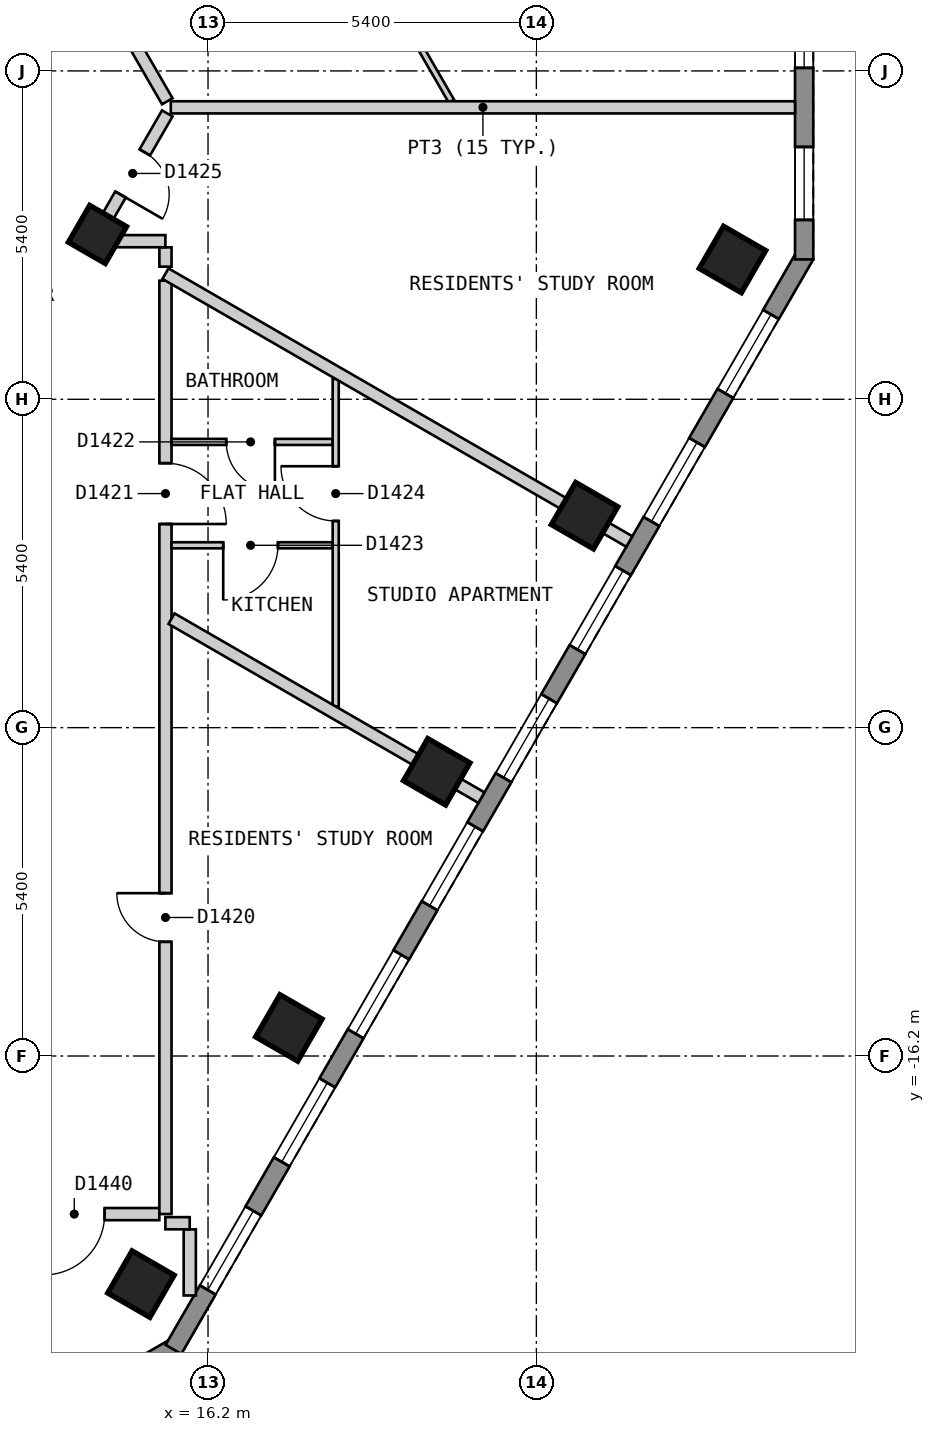
"""IFC4 building model, lengths in metres.
Left out: names, types, materials, properties, quantities, classifications, styles, units other than length and angle.
Written with IfcOpenShell. Run it as: python <this file> out.ifc"""

import sys

from ifc_helpers import new_model, si_unit, direction, frame, frame_2d, origin, origin_2d, place, context, subcontext, project, spatial, polyline, rectangle, outline, extrude, element, fill, save


model = new_model("IFC4")
c1 = context("Model", 3, precision=1e-05, world=origin(), true_north=direction((0.0, 1.0)))
c2 = subcontext(c1, "Body", "Model", "MODEL_VIEW")
j1 = project(units=[si_unit("LENGTHUNIT", "METRE"), si_unit("PLANEANGLEUNIT", "RADIAN")], contexts=[c1])
p1 = place(None, origin())
s1 = spatial("IfcSite", under=j1, at=p1, CompositionType="ELEMENT")
p2 = place(p1, origin())
s2 = spatial("IfcBuilding", under=s1, at=p2, CompositionType="ELEMENT")
p3 = place(p2, frame((0.0, 0.0, 178.2)))
s3 = spatial("IfcBuildingStorey", under=s2, at=p3, CompositionType="ELEMENT", Elevation=178.2)
for number, where, z_axis, x_axis in (
    (1, (15.097, -19.951, 0.0), (0.0, 0.0, 1.0), (0.5, 0.866, 0.0)),
    (2, (17.529, -15.738, 0.0), (0.0, 0.0, 1.0), (0.5, 0.866, 0.0)),
    (3, (19.961, -11.526, 0.0), (0.0, 0.0, 1.0), (0.5, 0.866, 0.0)),
    (4, (22.393, -7.314, 0.0), (0.0, 0.0, 1.0), (0.5, 0.866, 0.0)),
    (5, (24.825, -3.101, 0.0), (0.0, 0.0, 1.0), (0.5, 0.866, 0.0)),
):
    element("IfcColumn", number, at=place(p3, frame(where, z_axis=z_axis, x_axis=x_axis)), inside=s3, PredefinedType="COLUMN", context=c2, shape_type="SweptSolid", body=[
        extrude(rectangle(XDim=0.8, YDim=0.8, at=origin_2d()), origin(), (0.0, 0.0, 1.0), 3.0),
    ])
p4 = place(p3, frame((14.382, -2.689, 0.0), z_axis=(0.0, 0.0, 1.0), x_axis=(0.5, 0.866025403784, 0.0)))
e6 = element("IfcColumn", 6, at=p4, inside=s3, PredefinedType="COLUMN", context=c2, shape_type="SweptSolid", body=[
    extrude(rectangle(XDim=0.7, YDim=0.7, at=origin_2d()), origin(), (0.0, 0.0, 1.0), 3.0),
])
p5 = place(p3, frame((11.356, -23.47, 0.0), z_axis=(0.0, 0.0, 1.0), x_axis=(0.866022959057, 0.500004234368, 0.0)))
e7 = element("IfcWall", 7, at=p5, inside=s3, PredefinedType="SOLIDWALL", context=c2, shape_type="SweptSolid", body=[
    extrude(outline(polyline([(0.0, -0.15), (5.0, -0.15), (4.92, 0.15), (0.08, 0.15), (0.0, -0.15)])), origin(), (0.0, 0.0, 1.0), 2.7),
])
p6 = place(p5, frame((0.65, 0.0, 0.15)))
e8 = element("IfcOpeningElement", 8, at=p6, cuts=e7, PredefinedType="OPENING", context=c2, shape_type="SweptSolid", body=[
    extrude(rectangle(XDim=1.2, YDim=2.1, at=frame_2d((0.6, 1.05))), frame((0.0, 0.16, 0.0), z_axis=(0.0, -1.0, 0.0), x_axis=(1.0, 0.0, 0.0)), (0.0, 0.0, 1.0), 0.32),
])
p7 = place(p5, frame((3.149, 0.0, 0.15)))
e9 = element("IfcOpeningElement", 9, at=p7, cuts=e7, PredefinedType="OPENING", context=c2, shape_type="SweptSolid", body=[
    extrude(rectangle(XDim=1.2, YDim=2.1, at=frame_2d((0.6, 1.05))), frame((0.0, 0.16, 0.0), z_axis=(0.0, -1.0, 0.0), x_axis=(1.0, 0.0, 0.0)), (0.0, 0.0, 1.0), 0.32),
])
p8 = place(p3, frame((15.631, -21.025, 0.0), z_axis=(0.0, 0.0, 1.0), x_axis=(0.500018670445, 0.86601462413, 0.0)))
e10 = element("IfcWall", 10, at=p8, inside=s3, PredefinedType="SOLIDWALL", context=c2, shape_type="SweptSolid", body=[
    extrude(outline(polyline([(0.0, -0.15), (20.785, -0.15), (20.705, 0.15), (0.08, 0.15), (0.0, -0.15)])), origin(), (0.0, 0.0, 1.0), 2.7),
])
p9 = place(p8, frame((1.13, 0.0, 0.15)))
e11 = element("IfcOpeningElement", 11, at=p9, cuts=e10, PredefinedType="OPENING", context=c2, shape_type="SweptSolid", body=[
    extrude(rectangle(XDim=1.5, YDim=2.1, at=frame_2d((0.75, 1.05))), frame((0.0, 0.16, 0.0), z_axis=(0.0, -1.0, 0.0), x_axis=(1.0, 0.0, 0.0)), (0.0, 0.0, 1.0), 0.32),
])
p10 = place(p8, frame((3.562, 0.0, 0.15)))
e12 = element("IfcOpeningElement", 12, at=p10, cuts=e10, PredefinedType="OPENING", context=c2, shape_type="SweptSolid", body=[
    extrude(rectangle(XDim=1.5, YDim=2.1, at=frame_2d((0.75, 1.05))), frame((0.0, 0.16, 0.0), z_axis=(0.0, -1.0, 0.0), x_axis=(1.0, 0.0, 0.0)), (0.0, 0.0, 1.0), 0.32),
])
p11 = place(p8, frame((5.994, 0.0, 0.15)))
e13 = element("IfcOpeningElement", 13, at=p11, cuts=e10, PredefinedType="OPENING", context=c2, shape_type="SweptSolid", body=[
    extrude(rectangle(XDim=1.5, YDim=2.1, at=frame_2d((0.75, 1.05))), frame((0.0, 0.16, 0.0), z_axis=(0.0, -1.0, 0.0), x_axis=(1.0, 0.0, 0.0)), (0.0, 0.0, 1.0), 0.32),
])
p12 = place(p8, frame((8.425, 0.0, 0.15)))
e14 = element("IfcOpeningElement", 14, at=p12, cuts=e10, PredefinedType="OPENING", context=c2, shape_type="SweptSolid", body=[
    extrude(rectangle(XDim=1.5, YDim=2.1, at=frame_2d((0.75, 1.05))), frame((0.0, 0.16, 0.0), z_axis=(0.0, -1.0, 0.0), x_axis=(1.0, 0.0, 0.0)), (0.0, 0.0, 1.0), 0.32),
])
p13 = place(p8, frame((10.857, 0.0, 0.15)))
e15 = element("IfcOpeningElement", 15, at=p13, cuts=e10, PredefinedType="OPENING", context=c2, shape_type="SweptSolid", body=[
    extrude(rectangle(XDim=1.5, YDim=2.1, at=frame_2d((0.75, 1.05))), frame((0.0, 0.16, 0.0), z_axis=(0.0, -1.0, 0.0), x_axis=(1.0, 0.0, 0.0)), (0.0, 0.0, 1.0), 0.32),
])
p14 = place(p8, frame((13.289, 0.0, 0.15)))
e16 = element("IfcOpeningElement", 16, at=p14, cuts=e10, PredefinedType="OPENING", context=c2, shape_type="SweptSolid", body=[
    extrude(rectangle(XDim=1.5, YDim=2.1, at=frame_2d((0.75, 1.05))), frame((0.0, 0.16, 0.0), z_axis=(0.0, -1.0, 0.0), x_axis=(1.0, 0.0, 0.0)), (0.0, 0.0, 1.0), 0.32),
])
p15 = place(p8, frame((15.722, 0.0, 0.15)))
e17 = element("IfcOpeningElement", 17, at=p15, cuts=e10, PredefinedType="OPENING", context=c2, shape_type="SweptSolid", body=[
    extrude(rectangle(XDim=1.5, YDim=2.1, at=frame_2d((0.75, 1.05))), frame((0.0, 0.16, 0.0), z_axis=(0.0, -1.0, 0.0), x_axis=(1.0, 0.0, 0.0)), (0.0, 0.0, 1.0), 0.32),
])
p16 = place(p8, frame((18.154, 0.0, 0.15)))
e18 = element("IfcOpeningElement", 18, at=p16, cuts=e10, PredefinedType="OPENING", context=c2, shape_type="SweptSolid", body=[
    extrude(rectangle(XDim=1.5, YDim=2.1, at=frame_2d((0.75, 1.05))), frame((0.0, 0.16, 0.0), z_axis=(0.0, -1.0, 0.0), x_axis=(1.0, 0.0, 0.0)), (0.0, 0.0, 1.0), 0.32),
])
p17 = place(p3, frame((26.004, -3.1, 0.0), z_axis=(0.0, 0.0, 1.0), x_axis=(0.0, 1.0, 0.0)))
e19 = element("IfcWall", 19, at=p17, inside=s3, PredefinedType="SOLIDWALL", context=c2, shape_type="SweptSolid", body=[
    extrude(outline(polyline([(0.0, -0.15), (5.0, -0.15), (4.92, 0.15), (0.08, 0.15), (0.0, -0.15)])), origin(), (0.0, 0.0, 1.0), 2.7),
])
p18 = place(p17, frame((0.65, 0.0, 0.15)))
e20 = element("IfcOpeningElement", 20, at=p18, cuts=e19, PredefinedType="OPENING", context=c2, shape_type="SweptSolid", body=[
    extrude(rectangle(XDim=1.2, YDim=2.1, at=frame_2d((0.6, 1.05))), frame((0.0, 0.16, 0.0), z_axis=(0.0, -1.0, 0.0), x_axis=(1.0, 0.0, 0.0)), (0.0, 0.0, 1.0), 0.32),
])
p19 = place(p17, frame((3.15, 0.0, 0.15)))
e21 = element("IfcOpeningElement", 21, at=p19, cuts=e19, PredefinedType="OPENING", context=c2, shape_type="SweptSolid", body=[
    extrude(rectangle(XDim=1.2, YDim=2.1, at=frame_2d((0.6, 1.05))), frame((0.0, 0.16, 0.0), z_axis=(0.0, -1.0, 0.0), x_axis=(1.0, 0.0, 0.0)), (0.0, 0.0, 1.0), 0.32),
])
p20 = place(p3, frame((10.739, 7.8, 0.0), z_axis=(0.0, 0.0, 1.0), x_axis=(0.499964311759, -0.86604600742, 0.0)))
e22 = element("IfcWall", 22, at=p20, inside=s3, PredefinedType="PARTITIONING", context=c2, shape_type="SweptSolid", body=[
    extrude(rectangle(XDim=9.583, YDim=0.2, at=frame_2d((4.792, 0.0))), origin(), (0.0, 0.0, 1.0), 2.7),
])
p21 = place(p3, frame((15.5, -2.901, 0.0), z_axis=(0.0, 0.0, 1.0), x_axis=(0.0, -1.0, 0.0)))
e23 = element("IfcWall", 23, at=p21, inside=s3, PredefinedType="PARTITIONING", context=c2, shape_type="SweptSolid", body=[
    extrude(rectangle(XDim=0.318, YDim=0.2, at=frame_2d((0.159, 0.0))), origin(), (0.0, 0.0, 1.0), 2.7),
])
p22 = place(p3, frame((13.3, -18.8, 0.0), z_axis=(0.0, 0.0, 1.0), x_axis=(1.0, 0.0, 0.0)))
e24 = element("IfcWall", 24, at=p22, inside=s3, PredefinedType="PARTITIONING", context=c2, shape_type="SweptSolid", body=[
    extrude(rectangle(XDim=2.099, YDim=0.2, at=frame_2d((1.049, 0.0))), origin(), (0.0, 0.0, 1.0), 2.7),
])
p23 = place(p22, frame((0.2, 0.0, 0.0)))
e25 = element("IfcOpeningElement", 25, at=p23, cuts=e24, PredefinedType="OPENING", context=c2, shape_type="SweptSolid", body=[
    extrude(rectangle(XDim=1.0, YDim=2.1, at=frame_2d((0.5, 1.05))), frame((0.0, 0.11, 0.0), z_axis=(0.0, -1.0, 0.0), x_axis=(1.0, 0.0, 0.0)), (0.0, 0.0, 1.0), 0.22),
])
p24 = place(p3, frame((14.433, -2.8, 0.0), z_axis=(0.0, 0.0, 1.0), x_axis=(1.0, 0.0, 0.0)))
e26 = element("IfcWall", 26, at=p24, inside=s3, PredefinedType="PARTITIONING", context=c2, shape_type="SweptSolid", body=[
    extrude(rectangle(XDim=1.066, YDim=0.2, at=frame_2d((0.533, 0.0))), origin(), (0.0, 0.0, 1.0), 2.7),
])
p25 = place(p3, frame((14.318, -2.8, 0.0), z_axis=(0.0, 0.0, 1.0), x_axis=(0.49964693309, 0.866229151122, 0.0)))
e27 = element("IfcWall", 27, at=p25, inside=s3, PredefinedType="PARTITIONING", context=c2, shape_type="SweptSolid", body=[
    extrude(rectangle(XDim=2.426, YDim=0.2, at=frame_2d((1.213, 0.0))), origin(), (0.0, 0.0, 1.0), 2.7),
])
p26 = place(p25, frame((0.886, 0.0, 0.0)))
e28 = element("IfcOpeningElement", 28, at=p26, cuts=e27, PredefinedType="OPENING", context=c2, shape_type="SweptSolid", body=[
    extrude(rectangle(XDim=0.8, YDim=2.1, at=frame_2d((0.4, 1.05))), frame((0.0, 0.11, 0.0), z_axis=(0.0, -1.0, 0.0), x_axis=(1.0, 0.0, 0.0)), (0.0, 0.0, 1.0), 0.22),
])
p27 = place(p3, frame((15.5, -18.799, 0.0), z_axis=(0.0, 0.0, 1.0), x_axis=(0.0, 1.0, 0.0)))
e29 = element("IfcWall", 29, at=p27, inside=s3, PredefinedType="PARTITIONING", context=c2, shape_type="SweptSolid", body=[
    extrude(rectangle(XDim=15.349, YDim=0.2, at=frame_2d((7.675, 0.0))), origin(), (0.0, 0.0, 1.0), 2.7),
])
p28 = place(p27, frame((4.477, 0.0, 0.0)))
e30 = element("IfcOpeningElement", 30, at=p28, cuts=e29, PredefinedType="OPENING", context=c2, shape_type="SweptSolid", body=[
    extrude(rectangle(XDim=0.8, YDim=2.1, at=frame_2d((0.4, 1.05))), frame((0.0, 0.11, 0.0), z_axis=(0.0, -1.0, 0.0), x_axis=(1.0, 0.0, 0.0)), (0.0, 0.0, 1.0), 0.22),
])
p29 = place(p27, frame((11.348, 0.0, 0.0)))
e31 = element("IfcOpeningElement", 31, at=p29, cuts=e29, PredefinedType="OPENING", context=c2, shape_type="SweptSolid", body=[
    extrude(rectangle(XDim=1.0, YDim=2.1, at=frame_2d((0.5, 1.05))), frame((0.0, 0.11, 0.0), z_axis=(0.0, -1.0, 0.0), x_axis=(1.0, 0.0, 0.0)), (0.0, 0.0, 1.0), 0.22),
])
p30 = place(p3, frame((19.597, 0.551, 0.0), z_axis=(0.0, 0.0, 1.0), x_axis=(0.500576018574, -0.86569258379, 0.0)))
e32 = element("IfcWall", 32, at=p30, inside=s3, PredefinedType="PARTITIONING", context=c2, shape_type="SweptSolid", body=[
    extrude(rectangle(XDim=1.213, YDim=0.1, at=frame_2d((0.606, 0.0))), origin(), (0.0, 0.0, 1.0), 2.7),
])
p31 = place(p3, frame((15.6, -6.101, 0.0), z_axis=(0.0, 0.0, 1.0), x_axis=(1.0, 0.0, 0.0)))
e33 = element("IfcWall", 33, at=p31, inside=s3, PredefinedType="PARTITIONING", context=c2, shape_type="SweptSolid", body=[
    extrude(rectangle(XDim=2.65, YDim=0.1, at=frame_2d((1.325, 0.0))), origin(), (0.0, 0.0, 1.0), 2.7),
])
p32 = place(p31, frame((0.9, 0.0, 0.0)))
e34 = element("IfcOpeningElement", 34, at=p32, cuts=e33, PredefinedType="OPENING", context=c2, shape_type="SweptSolid", body=[
    extrude(rectangle(XDim=0.8, YDim=2.1, at=frame_2d((0.4, 1.05))), frame((0.0, 0.06, 0.0), z_axis=(0.0, -1.0, 0.0), x_axis=(1.0, 0.0, 0.0)), (0.0, 0.0, 1.0), 0.12),
])
p33 = place(p3, frame((15.6, -7.801, 0.0), z_axis=(0.0, 0.0, 1.0), x_axis=(1.0, 0.0, 0.0)))
e35 = element("IfcWall", 35, at=p33, inside=s3, PredefinedType="PARTITIONING", context=c2, shape_type="SweptSolid", body=[
    extrude(rectangle(XDim=2.65, YDim=0.1, at=frame_2d((1.325, 0.0))), origin(), (0.0, 0.0, 1.0), 2.7),
])
p34 = place(p33, frame((0.85, 0.0, 0.0)))
e36 = element("IfcOpeningElement", 36, at=p34, cuts=e35, PredefinedType="OPENING", context=c2, shape_type="SweptSolid", body=[
    extrude(rectangle(XDim=0.9, YDim=2.1, at=frame_2d((0.45, 1.05))), frame((0.0, 0.06, 0.0), z_axis=(0.0, -1.0, 0.0), x_axis=(1.0, 0.0, 0.0)), (0.0, 0.0, 1.0), 0.12),
])
p35 = place(p3, frame((18.3, -10.452, 0.0), z_axis=(0.0, 0.0, 1.0), x_axis=(0.0, 1.0, 0.0)))
e37 = element("IfcWall", 37, at=p35, inside=s3, PredefinedType="PARTITIONING", context=c2, shape_type="SweptSolid", body=[
    extrude(rectangle(XDim=5.386, YDim=0.1, at=frame_2d((2.693, 0.0))), origin(), (0.0, 0.0, 1.0), 2.7),
])
p36 = place(p35, frame((3.051, 0.0, 0.0)))
e38 = element("IfcOpeningElement", 38, at=p36, cuts=e37, PredefinedType="OPENING", context=c2, shape_type="SweptSolid", body=[
    extrude(rectangle(XDim=0.9, YDim=2.1, at=frame_2d((0.45, 1.05))), frame((0.0, 0.06, 0.0), z_axis=(0.0, -1.0, 0.0), x_axis=(1.0, 0.0, 0.0)), (0.0, 0.0, 1.0), 0.12),
])
p37 = place(p3, frame((15.9, -19.051, 0.0), z_axis=(0.0, 0.0, 1.0), x_axis=(0.0, -1.0, 0.0)))
e39 = element("IfcWall", 39, at=p37, inside=s3, PredefinedType="PARTITIONING", context=c2, shape_type="SweptSolid", body=[
    extrude(rectangle(XDim=1.087, YDim=0.2, at=frame_2d((0.543, 0.0))), origin(), (0.0, 0.0, 1.0), 2.7),
])
p38 = place(p3, frame((15.6, -9.008, 0.0), z_axis=(0.0, 0.0, 1.0), x_axis=(0.866013576751, -0.500020484464, 0.0)))
e40 = element("IfcWall", 40, at=p38, inside=s3, PredefinedType="PARTITIONING", context=c2, shape_type="SweptSolid", body=[
    extrude(rectangle(XDim=5.885, YDim=0.2, at=frame_2d((2.943, 0.0))), origin(), (0.0, 0.0, 1.0), 2.7),
])
p39 = place(p3, frame((15.5, -3.334, 0.0), z_axis=(0.0, 0.0, 1.0), x_axis=(0.866001896501, -0.5000407136, 0.0)))
e41 = element("IfcWall", 41, at=p39, inside=s3, PredefinedType="PARTITIONING", context=c2, shape_type="SweptSolid", body=[
    extrude(rectangle(XDim=8.809, YDim=0.2, at=frame_2d((4.405, 0.0))), origin(), (0.0, 0.0, 1.0), 2.7),
])
p40 = place(p3, frame((15.588, -0.599, 0.0), z_axis=(0.0, 0.0, 1.0), x_axis=(1.0, 0.0, 0.0)))
e42 = element("IfcWall", 42, at=p40, inside=s3, PredefinedType="PARTITIONING", context=c2, shape_type="SweptSolid", body=[
    extrude(rectangle(XDim=10.266, YDim=0.2, at=frame_2d((5.133, 0.0))), origin(), (0.0, 0.0, 1.0), 2.7),
])
p41 = place(p3, frame((15.499, -18.95, 0.0), z_axis=(0.0, 0.0, 1.0), x_axis=(1.0, 0.0, 0.0)))
e43 = element("IfcWall", 43, at=p41, inside=s3, PredefinedType="PARTITIONING", context=c2, shape_type="SweptSolid", body=[
    extrude(rectangle(XDim=0.4, YDim=0.2, at=frame_2d((0.2, 0.0))), origin(), (0.0, 0.0, 1.0), 2.7),
])
p42 = place(p9, origin())
e44 = element("IfcWindow", 44, at=p42, inside=s3, PartitioningType="SINGLE_PANEL", PredefinedType="WINDOW", context=c2, shape_type="SweptSolid", body=[
    extrude(rectangle(XDim=1.5, YDim=2.1, at=frame_2d((0.75, 1.05))), frame((0.0, 0.03, 0.0), z_axis=(0.0, -1.0, 0.0), x_axis=(1.0, 0.0, 0.0)), (0.0, 0.0, 1.0), 0.06),
])
fill(e11, e44)
p43 = place(p10, origin())
e45 = element("IfcWindow", 45, at=p43, inside=s3, PartitioningType="SINGLE_PANEL", PredefinedType="WINDOW", context=c2, shape_type="SweptSolid", body=[
    extrude(rectangle(XDim=1.5, YDim=2.1, at=frame_2d((0.75, 1.05))), frame((0.0, 0.03, 0.0), z_axis=(0.0, -1.0, 0.0), x_axis=(1.0, 0.0, 0.0)), (0.0, 0.0, 1.0), 0.06),
])
fill(e12, e45)
p44 = place(p11, origin())
e46 = element("IfcWindow", 46, at=p44, inside=s3, PartitioningType="SINGLE_PANEL", PredefinedType="WINDOW", context=c2, shape_type="SweptSolid", body=[
    extrude(rectangle(XDim=1.5, YDim=2.1, at=frame_2d((0.75, 1.05))), frame((0.0, 0.03, 0.0), z_axis=(0.0, -1.0, 0.0), x_axis=(1.0, 0.0, 0.0)), (0.0, 0.0, 1.0), 0.06),
])
fill(e13, e46)
p45 = place(p12, origin())
e47 = element("IfcWindow", 47, at=p45, inside=s3, PartitioningType="SINGLE_PANEL", PredefinedType="WINDOW", context=c2, shape_type="SweptSolid", body=[
    extrude(rectangle(XDim=1.5, YDim=2.1, at=frame_2d((0.75, 1.05))), frame((0.0, 0.03, 0.0), z_axis=(0.0, -1.0, 0.0), x_axis=(1.0, 0.0, 0.0)), (0.0, 0.0, 1.0), 0.06),
])
fill(e14, e47)
p46 = place(p13, origin())
e48 = element("IfcWindow", 48, at=p46, inside=s3, PartitioningType="SINGLE_PANEL", PredefinedType="WINDOW", context=c2, shape_type="SweptSolid", body=[
    extrude(rectangle(XDim=1.5, YDim=2.1, at=frame_2d((0.75, 1.05))), frame((0.0, 0.03, 0.0), z_axis=(0.0, -1.0, 0.0), x_axis=(1.0, 0.0, 0.0)), (0.0, 0.0, 1.0), 0.06),
])
fill(e15, e48)
p47 = place(p14, origin())
e49 = element("IfcWindow", 49, at=p47, inside=s3, PartitioningType="SINGLE_PANEL", PredefinedType="WINDOW", context=c2, shape_type="SweptSolid", body=[
    extrude(rectangle(XDim=1.5, YDim=2.1, at=frame_2d((0.75, 1.05))), frame((0.0, 0.03, 0.0), z_axis=(0.0, -1.0, 0.0), x_axis=(1.0, 0.0, 0.0)), (0.0, 0.0, 1.0), 0.06),
])
fill(e16, e49)
p48 = place(p15, origin())
e50 = element("IfcWindow", 50, at=p48, inside=s3, PartitioningType="SINGLE_PANEL", PredefinedType="WINDOW", context=c2, shape_type="SweptSolid", body=[
    extrude(rectangle(XDim=1.5, YDim=2.1, at=frame_2d((0.75, 1.05))), frame((0.0, 0.03, 0.0), z_axis=(0.0, -1.0, 0.0), x_axis=(1.0, 0.0, 0.0)), (0.0, 0.0, 1.0), 0.06),
])
fill(e17, e50)
p49 = place(p16, origin())
e51 = element("IfcWindow", 51, at=p49, inside=s3, PartitioningType="SINGLE_PANEL", PredefinedType="WINDOW", context=c2, shape_type="SweptSolid", body=[
    extrude(rectangle(XDim=1.5, YDim=2.1, at=frame_2d((0.75, 1.05))), frame((0.0, 0.03, 0.0), z_axis=(0.0, -1.0, 0.0), x_axis=(1.0, 0.0, 0.0)), (0.0, 0.0, 1.0), 0.06),
])
fill(e18, e51)
p50 = place(p18, origin())
e52 = element("IfcWindow", 52, at=p50, inside=s3, PartitioningType="SINGLE_PANEL", PredefinedType="WINDOW", context=c2, shape_type="SweptSolid", body=[
    extrude(rectangle(XDim=1.2, YDim=2.1, at=frame_2d((0.6, 1.05))), frame((0.0, 0.03, 0.0), z_axis=(0.0, -1.0, 0.0), x_axis=(1.0, 0.0, 0.0)), (0.0, 0.0, 1.0), 0.06),
])
fill(e20, e52)
p51 = place(p19, origin())
e53 = element("IfcWindow", 53, at=p51, inside=s3, PartitioningType="SINGLE_PANEL", PredefinedType="WINDOW", context=c2, shape_type="SweptSolid", body=[
    extrude(rectangle(XDim=1.2, YDim=2.1, at=frame_2d((0.6, 1.05))), frame((0.0, 0.03, 0.0), z_axis=(0.0, -1.0, 0.0), x_axis=(1.0, 0.0, 0.0)), (0.0, 0.0, 1.0), 0.06),
])
fill(e21, e53)
p52 = place(p28, origin())
e54 = element("IfcDoor", 54, at=p52, inside=s3, OperationType="SINGLE_SWING_RIGHT", PredefinedType="DOOR", context=c2, shape_type="SweptSolid", body=[
    extrude(rectangle(XDim=0.8, YDim=2.1, at=frame_2d((0.4, 1.05))), frame((0.0, 0.025, 0.0), z_axis=(0.0, -1.0, 0.0), x_axis=(1.0, 0.0, 0.0)), (0.0, 0.0, 1.0), 0.05),
])
fill(e30, e54)
p53 = place(p29, origin())
e55 = element("IfcDoor", 55, at=p53, inside=s3, OperationType="SINGLE_SWING_LEFT", PredefinedType="DOOR", context=c2, shape_type="SweptSolid", body=[
    extrude(rectangle(XDim=1.0, YDim=2.1, at=frame_2d((0.5, 1.05))), frame((0.0, 0.025, 0.0), z_axis=(0.0, -1.0, 0.0), x_axis=(1.0, 0.0, 0.0)), (0.0, 0.0, 1.0), 0.05),
])
fill(e31, e55)
p54 = place(p32, origin())
e56 = element("IfcDoor", 56, at=p54, inside=s3, OperationType="SINGLE_SWING_RIGHT", PredefinedType="DOOR", context=c2, shape_type="SweptSolid", body=[
    extrude(rectangle(XDim=0.8, YDim=2.1, at=frame_2d((0.4, 1.05))), frame((0.0, 0.025, 0.0), z_axis=(0.0, -1.0, 0.0), x_axis=(1.0, 0.0, 0.0)), (0.0, 0.0, 1.0), 0.05),
])
fill(e34, e56)
p55 = place(p34, origin())
e57 = element("IfcDoor", 57, at=p55, inside=s3, OperationType="SINGLE_SWING_LEFT", PredefinedType="DOOR", context=c2, shape_type="SweptSolid", body=[
    extrude(rectangle(XDim=0.9, YDim=2.1, at=frame_2d((0.45, 1.05))), frame((0.0, 0.025, 0.0), z_axis=(0.0, -1.0, 0.0), x_axis=(1.0, 0.0, 0.0)), (0.0, 0.0, 1.0), 0.05),
])
fill(e36, e57)
p56 = place(p36, origin())
e58 = element("IfcDoor", 58, at=p56, inside=s3, OperationType="SINGLE_SWING_RIGHT", PredefinedType="DOOR", context=c2, shape_type="SweptSolid", body=[
    extrude(rectangle(XDim=0.9, YDim=2.1, at=frame_2d((0.45, 1.05))), frame((0.0, 0.025, 0.0), z_axis=(0.0, -1.0, 0.0), x_axis=(1.0, 0.0, 0.0)), (0.0, 0.0, 1.0), 0.05),
])
fill(e38, e58)
p57 = place(p26, origin())
e59 = element("IfcDoor", 59, at=p57, inside=s3, OperationType="SINGLE_SWING_LEFT", PredefinedType="DOOR", context=c2, shape_type="SweptSolid", body=[
    extrude(rectangle(XDim=0.8, YDim=2.1, at=frame_2d((0.4, 1.05))), frame((0.0, 0.025, 0.0), z_axis=(0.0, -1.0, 0.0), x_axis=(1.0, 0.0, 0.0)), (0.0, 0.0, 1.0), 0.05),
])
fill(e28, e59)
p58 = place(p23, origin())
e60 = element("IfcDoor", 60, at=p58, inside=s3, OperationType="SINGLE_SWING_LEFT", PredefinedType="DOOR", context=c2, shape_type="SweptSolid", body=[
    extrude(rectangle(XDim=1.0, YDim=2.1, at=frame_2d((0.5, 1.05))), frame((0.0, 0.025, 0.0), z_axis=(0.0, -1.0, 0.0), x_axis=(1.0, 0.0, 0.0)), (0.0, 0.0, 1.0), 0.05),
])
fill(e25, e60)
save(model, sys.argv[1])
